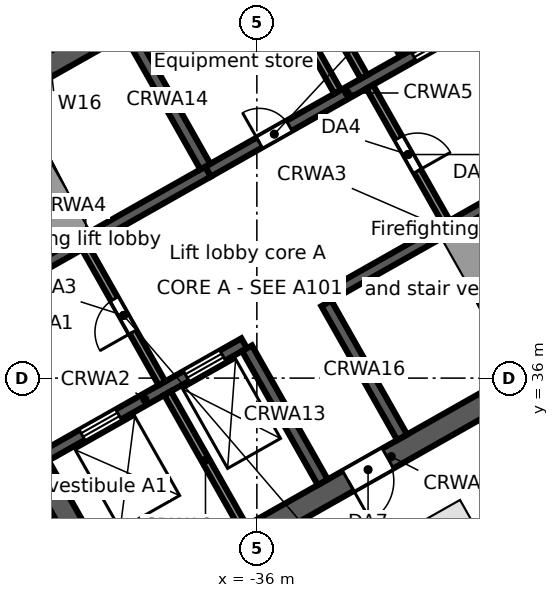
"""IFC4 building model, lengths in metres.
Left out: names, types, materials, properties, quantities, classifications, styles, units other than length and angle.
Written with IfcOpenShell. Run it as: python <this file> out.ifc"""

import sys

from ifc_helpers import new_model, si_unit, direction, frame, frame_2d, origin, origin_2d, place, context, subcontext, project, spatial, rectangle, extrude, element, fill, save


model = new_model("IFC4")
c1 = context("Model", 3, precision=1e-05, world=origin(), true_north=direction((0.0, 1.0)))
c2 = subcontext(c1, "Body", "Model", "MODEL_VIEW")
j1 = project(units=[si_unit("LENGTHUNIT", "METRE"), si_unit("PLANEANGLEUNIT", "RADIAN")], contexts=[c1])
p1 = place(None, origin())
s1 = spatial("IfcSite", under=j1, at=p1, CompositionType="ELEMENT")
p2 = place(p1, origin())
s2 = spatial("IfcBuilding", under=s1, at=p2, CompositionType="ELEMENT")
p3 = place(p2, origin())
s3 = spatial("IfcBuildingStorey", under=s2, at=p3, CompositionType="ELEMENT", Elevation=0.0)
p4 = place(p3, frame((-30.976, 31.635, 0.0), z_axis=(0.0, 0.0, 1.0), x_axis=(0.87035569594, 0.492423560103, 0.0)))
e1 = element("IfcColumn", 1, at=p4, inside=s3, PredefinedType="COLUMN", context=c2, shape_type="SweptSolid", body=[
    extrude(rectangle(XDim=1.7, YDim=1.7, at=origin_2d()), origin(), (0.0, 0.0, 1.0), 6.5),
])
p5 = place(p3, frame((-63.707, 41.701, 0.0), z_axis=(0.0, 0.0, 1.0), x_axis=(0.870355510268, 0.492423888277, 0.0)))
e2 = element("IfcWall", 2, at=p5, inside=s3, PredefinedType="STANDARD", context=c2, shape_type="SweptSolid", body=[
    extrude(rectangle(XDim=67.903, YDim=0.3, at=frame_2d((33.952, 0.0))), origin(), (0.0, 0.0, 1.0), 6.15),
])
p6 = place(p5, frame((44.274, 0.0, 0.0)))
e3 = element("IfcOpeningElement", 3, at=p6, cuts=e2, PredefinedType="OPENING", context=c2, shape_type="SweptSolid", body=[
    extrude(rectangle(XDim=1.2, YDim=2.4, at=frame_2d((0.6, 1.2))), frame((0.0, 0.16, 0.0), z_axis=(0.0, -1.0, 0.0), x_axis=(1.0, 0.0, 0.0)), (0.0, 0.0, 1.0), 0.32),
])
p7 = place(p5, frame((15.222, 0.0, 0.0)))
e4 = element("IfcOpeningElement", 4, at=p7, cuts=e2, PredefinedType="OPENING", context=c2, shape_type="SweptSolid", body=[
    extrude(rectangle(XDim=1.2, YDim=2.4, at=frame_2d((0.6, 1.2))), frame((0.0, 0.16, 0.0), z_axis=(0.0, -1.0, 0.0), x_axis=(1.0, 0.0, 0.0)), (0.0, 0.0, 1.0), 0.32),
])
p8 = place(p3, frame((-39.862, 29.749, 0.0), z_axis=(0.0, 0.0, 1.0), x_axis=(0.870350116061, 0.492433422375, 0.0)))
e5 = element("IfcWall", 5, at=p8, inside=s3, PredefinedType="SOLIDWALL", context=c2, shape_type="SweptSolid", body=[
    extrude(rectangle(XDim=17.0, YDim=0.6, at=frame_2d((8.5, 0.0))), origin(), (0.0, 0.0, 1.0), 6.15),
])
p9 = place(p8, frame((7.2, 0.0, 0.0)))
e6 = element("IfcOpeningElement", 6, at=p9, cuts=e5, PredefinedType="OPENING", context=c2, shape_type="SweptSolid", body=[
    extrude(rectangle(XDim=1.2, YDim=2.1, at=frame_2d((0.6, 1.05))), frame((0.0, 0.31, 0.0), z_axis=(0.0, -1.0, 0.0), x_axis=(1.0, 0.0, 0.0)), (0.0, 0.0, 1.0), 0.62),
])
p10 = place(p3, frame((-41.556, 33.961, 0.0), z_axis=(0.0, 0.0, 1.0), x_axis=(0.870343731308, 0.492444706919, 0.0)))
e7 = element("IfcWall", 7, at=p10, inside=s3, PredefinedType="SOLIDWALL", context=c2, shape_type="SweptSolid", body=[
    extrude(rectangle(XDim=6.0, YDim=0.3, at=frame_2d((3.0, 0.0))), origin(), (0.0, 0.0, 1.0), 6.15),
])
p11 = place(p10, frame((1.1, 0.0, 0.0)))
e8 = element("IfcOpeningElement", 8, at=p11, cuts=e7, PredefinedType="OPENING", context=c2, shape_type="SweptSolid", body=[
    extrude(rectangle(XDim=1.1, YDim=2.1, at=frame_2d((0.55, 1.05))), frame((0.0, 0.16, 0.0), z_axis=(0.0, -1.0, 0.0), x_axis=(1.0, 0.0, 0.0)), (0.0, 0.0, 1.0), 0.32),
])
p12 = place(p10, frame((4.25, 0.0, 0.0)))
e9 = element("IfcOpeningElement", 9, at=p12, cuts=e7, PredefinedType="OPENING", context=c2, shape_type="SweptSolid", body=[
    extrude(rectangle(XDim=1.1, YDim=2.1, at=frame_2d((0.55, 1.05))), frame((0.0, 0.16, 0.0), z_axis=(0.0, -1.0, 0.0), x_axis=(1.0, 0.0, 0.0)), (0.0, 0.0, 1.0), 0.32),
])
p13 = place(p3, frame((-34.245, 38.097, 0.0), z_axis=(0.0, 0.0, 1.0), x_axis=(0.870364910201, 0.492407273597, 0.0)))
e10 = element("IfcWall", 10, at=p13, inside=s3, PredefinedType="SOLIDWALL", context=c2, shape_type="SweptSolid", body=[
    extrude(rectangle(XDim=7.4, YDim=0.3, at=frame_2d((3.7, 0.0))), origin(), (0.0, 0.0, 1.0), 6.15),
])
p14 = place(p13, frame((6.2, 0.0, 0.0)))
e11 = element("IfcOpeningElement", 11, at=p14, cuts=e10, PredefinedType="OPENING", context=c2, shape_type="SweptSolid", body=[
    extrude(rectangle(XDim=1.0, YDim=2.1, at=frame_2d((0.5, 1.05))), frame((0.0, 0.16, 0.0), z_axis=(0.0, -1.0, 0.0), x_axis=(1.0, 0.0, 0.0)), (0.0, 0.0, 1.0), 0.32),
])
p15 = place(p3, frame((-43.723, 37.791, 0.0), z_axis=(0.0, 0.0, 1.0), x_axis=(0.87035077051, 0.49243226567, 0.0)))
e12 = element("IfcWall", 12, at=p15, inside=s3, PredefinedType="SOLIDWALL", context=c2, shape_type="SweptSolid", body=[
    extrude(rectangle(XDim=7.4, YDim=0.3, at=frame_2d((3.7, 0.0))), origin(), (0.0, 0.0, 1.0), 6.15),
])
p16 = place(p15, frame((0.2, 0.0, 0.0)))
e13 = element("IfcOpeningElement", 13, at=p16, cuts=e12, PredefinedType="OPENING", context=c2, shape_type="SweptSolid", body=[
    extrude(rectangle(XDim=1.0, YDim=2.1, at=frame_2d((0.5, 1.05))), frame((0.0, 0.16, 0.0), z_axis=(0.0, -1.0, 0.0), x_axis=(1.0, 0.0, 0.0)), (0.0, 0.0, 1.0), 0.32),
])
p17 = place(p3, frame((-37.282, 41.435, 0.0), z_axis=(0.0, 0.0, 1.0), x_axis=(0.870356516133, 0.492422110414, 0.0)))
e14 = element("IfcWall", 14, at=p17, inside=s3, PredefinedType="SOLIDWALL", context=c2, shape_type="SweptSolid", body=[
    extrude(rectangle(XDim=8.4, YDim=0.3, at=frame_2d((4.2, 0.0))), origin(), (0.0, 0.0, 1.0), 6.15),
])
p18 = place(p17, frame((6.2, 0.0, 0.0)))
e15 = element("IfcOpeningElement", 15, at=p18, cuts=e14, PredefinedType="OPENING", context=c2, shape_type="SweptSolid", body=[
    extrude(rectangle(XDim=1.1, YDim=2.1, at=frame_2d((0.55, 1.05))), frame((0.0, 0.16, 0.0), z_axis=(0.0, -1.0, 0.0), x_axis=(1.0, 0.0, 0.0)), (0.0, 0.0, 1.0), 0.32),
])
p19 = place(p17, frame((1.55, 0.0, 0.0)))
e16 = element("IfcOpeningElement", 16, at=p19, cuts=e14, PredefinedType="OPENING", context=c2, shape_type="SweptSolid", body=[
    extrude(rectangle(XDim=0.9, YDim=2.1, at=frame_2d((0.45, 1.05))), frame((0.0, 0.16, 0.0), z_axis=(0.0, -1.0, 0.0), x_axis=(1.0, 0.0, 0.0)), (0.0, 0.0, 1.0), 0.32),
])
p20 = place(p3, frame((-46.461, 41.412, 0.0), z_axis=(0.0, 0.0, 1.0), x_axis=(0.870350116061, 0.492433422375, 0.0)))
e17 = element("IfcWall", 17, at=p20, inside=s3, PredefinedType="SOLIDWALL", context=c2, shape_type="SweptSolid", body=[
    extrude(rectangle(XDim=17.0, YDim=0.6, at=frame_2d((8.5, 0.0))), origin(), (0.0, 0.0, 1.0), 6.15),
])
p21 = place(p3, frame((-46.052, 41.298, 0.0), z_axis=(0.0, 0.0, 1.0), x_axis=(0.492418598281, -0.870358503186, 0.0)))
e18 = element("IfcWall", 18, at=p21, inside=s3, PredefinedType="SOLIDWALL", context=c2, shape_type="SweptSolid", body=[
    extrude(rectangle(XDim=12.8, YDim=0.6, at=frame_2d((6.4, 0.0))), origin(), (0.0, 0.0, 1.0), 6.15),
])
p22 = place(p21, frame((5.8, 0.0, 0.0)))
e19 = element("IfcOpeningElement", 19, at=p22, cuts=e18, PredefinedType="OPENING", context=c2, shape_type="SweptSolid", body=[
    extrude(rectangle(XDim=1.2, YDim=2.1, at=frame_2d((0.6, 1.05))), frame((0.0, 0.31, 0.0), z_axis=(0.0, -1.0, 0.0), x_axis=(1.0, 0.0, 0.0)), (0.0, 0.0, 1.0), 0.62),
])
p23 = place(p3, frame((-38.349, 35.603, 0.0), z_axis=(0.0, 0.0, 1.0), x_axis=(0.49241474071, -0.870360685654, 0.0)))
e20 = element("IfcWall", 20, at=p23, inside=s3, PredefinedType="SOLIDWALL", context=c2, shape_type="SweptSolid", body=[
    extrude(rectangle(XDim=4.05, YDim=0.2, at=frame_2d((2.025, 0.0))), origin(), (0.0, 0.0, 1.0), 6.15),
])
p24 = place(p3, frame((-40.516, 39.433, 0.0), z_axis=(0.0, 0.0, 1.0), x_axis=(0.492453559952, -0.87033872216, 0.0)))
e21 = element("IfcWall", 21, at=p24, inside=s3, PredefinedType="PARTITIONING", context=c2, shape_type="SweptSolid", body=[
    extrude(rectangle(XDim=4.1, YDim=0.2, at=frame_2d((2.05, 0.0))), origin(), (0.0, 0.0, 1.0), 6.15),
])
p25 = place(p24, frame((1.55, 0.0, 0.0)))
e22 = element("IfcOpeningElement", 22, at=p25, cuts=e21, PredefinedType="OPENING", context=c2, shape_type="SweptSolid", body=[
    extrude(rectangle(XDim=1.0, YDim=2.1, at=frame_2d((0.5, 1.05))), frame((0.0, 0.11, 0.0), z_axis=(0.0, -1.0, 0.0), x_axis=(1.0, 0.0, 0.0)), (0.0, 0.0, 1.0), 0.22),
])
p26 = place(p3, frame((-36.26, 36.785, 0.0), z_axis=(0.0, 0.0, 1.0), x_axis=(0.492440575896, -0.870346068648, 0.0)))
e23 = element("IfcWall", 23, at=p26, inside=s3, PredefinedType="SOLIDWALL", context=c2, shape_type="SweptSolid", body=[
    extrude(rectangle(XDim=4.05, YDim=0.3, at=frame_2d((2.025, 0.0))), origin(), (0.0, 0.0, 1.0), 6.15),
])
p27 = place(p3, frame((-39.35, 45.09, 0.0), z_axis=(0.0, 0.0, 1.0), x_axis=(0.49241474071, -0.870360685654, 0.0)))
e24 = element("IfcWall", 24, at=p27, inside=s3, PredefinedType="SOLIDWALL", context=c2, shape_type="SweptSolid", body=[
    extrude(rectangle(XDim=4.05, YDim=0.3, at=frame_2d((2.025, 0.0))), origin(), (0.0, 0.0, 1.0), 6.15),
])
p28 = place(p3, frame((-34.171, 37.967, 0.0), z_axis=(0.0, 0.0, 1.0), x_axis=(0.492394910396, -0.870371904542, 0.0)))
e25 = element("IfcWall", 25, at=p28, inside=s3, PredefinedType="SOLIDWALL", context=c2, shape_type="SweptSolid", body=[
    extrude(rectangle(XDim=4.05, YDim=0.3, at=frame_2d((2.025, 0.0))), origin(), (0.0, 0.0, 1.0), 6.15),
])
p29 = place(p3, frame((-35.869, 47.06, 0.0), z_axis=(0.0, 0.0, 1.0), x_axis=(0.49241474071, -0.870360685654, 0.0)))
e26 = element("IfcWall", 26, at=p29, inside=s3, PredefinedType="SOLIDWALL", context=c2, shape_type="SweptSolid", body=[
    extrude(rectangle(XDim=4.05, YDim=0.2, at=frame_2d((2.025, 0.0))), origin(), (0.0, 0.0, 1.0), 6.15),
])
p30 = place(p3, frame((-33.031, 43.667, 0.0), z_axis=(0.0, 0.0, 1.0), x_axis=(0.492408451753, -0.87036424366, 0.0)))
e27 = element("IfcWall", 27, at=p30, inside=s3, PredefinedType="PARTITIONING", context=c2, shape_type="SweptSolid", body=[
    extrude(rectangle(XDim=4.1, YDim=0.2, at=frame_2d((2.05, 0.0))), origin(), (0.0, 0.0, 1.0), 6.15),
])
p31 = place(p30, frame((1.55, 0.0, 0.0)))
e28 = element("IfcOpeningElement", 28, at=p31, cuts=e27, PredefinedType="OPENING", context=c2, shape_type="SweptSolid", body=[
    extrude(rectangle(XDim=1.0, YDim=2.1, at=frame_2d((0.5, 1.05))), frame((0.0, 0.11, 0.0), z_axis=(0.0, -1.0, 0.0), x_axis=(1.0, 0.0, 0.0)), (0.0, 0.0, 1.0), 0.22),
])
p32 = place(p3, frame((-35.173, 47.454, 0.0), z_axis=(0.0, 0.0, 1.0), x_axis=(0.492440575896, -0.870346068648, 0.0)))
e29 = element("IfcWall", 29, at=p32, inside=s3, PredefinedType="SOLIDWALL", context=c2, shape_type="SweptSolid", body=[
    extrude(rectangle(XDim=4.05, YDim=0.2, at=frame_2d((2.025, 0.0))), origin(), (0.0, 0.0, 1.0), 6.15),
])
p33 = place(p3, frame((-31.778, 49.374, 0.0), z_axis=(0.0, 0.0, 1.0), x_axis=(0.492433046652, -0.870350328641, 0.0)))
e30 = element("IfcWall", 30, at=p33, inside=s3, PredefinedType="SOLIDWALL", context=c2, shape_type="SweptSolid", body=[
    extrude(rectangle(XDim=12.8, YDim=0.6, at=frame_2d((6.4, 0.0))), origin(), (0.0, 0.0, 1.0), 6.15),
])
p34 = place(p33, frame((5.8, 0.0, 0.0)))
e31 = element("IfcOpeningElement", 31, at=p34, cuts=e30, PredefinedType="OPENING", context=c2, shape_type="SweptSolid", body=[
    extrude(rectangle(XDim=1.2, YDim=2.1, at=frame_2d((0.6, 1.05))), frame((0.0, 0.31, 0.0), z_axis=(0.0, -1.0, 0.0), x_axis=(1.0, 0.0, 0.0)), (0.0, 0.0, 1.0), 0.62),
])
p35 = place(p3, frame((-61.823, 37.087, 0.0), z_axis=(0.0, 0.0, 1.0), x_axis=(0.854710834679, -0.519104410579, 0.0)))
e32 = element("IfcWall", 32, at=p35, inside=s3, PredefinedType="PARTITIONING", context=c2, shape_type="SweptSolid", body=[
    extrude(rectangle(XDim=24.064, YDim=0.125, at=frame_2d((12.032, 0.0))), origin(), (0.0, 0.0, 1.0), 5.212),
])
p36 = place(p18, origin())
e33 = element("IfcDoor", 33, at=p36, inside=s3, OperationType="DOUBLE_DOOR_SLIDING", PredefinedType="DOOR", context=c2, shape_type="SweptSolid", body=[
    extrude(rectangle(XDim=1.1, YDim=2.1, at=frame_2d((0.55, 1.05))), frame((0.0, 0.025, 0.0), z_axis=(0.0, -1.0, 0.0), x_axis=(1.0, 0.0, 0.0)), (0.0, 0.0, 1.0), 0.05),
])
fill(e15, e33)
p37 = place(p11, origin())
e34 = element("IfcDoor", 34, at=p37, inside=s3, OperationType="DOUBLE_DOOR_SLIDING", PredefinedType="DOOR", context=c2, shape_type="SweptSolid", body=[
    extrude(rectangle(XDim=1.1, YDim=2.1, at=frame_2d((0.55, 1.05))), frame((0.0, 0.025, 0.0), z_axis=(0.0, -1.0, 0.0), x_axis=(1.0, 0.0, 0.0)), (0.0, 0.0, 1.0), 0.05),
])
fill(e8, e34)
p38 = place(p12, origin())
e35 = element("IfcDoor", 35, at=p38, inside=s3, OperationType="DOUBLE_DOOR_SLIDING", PredefinedType="DOOR", context=c2, shape_type="SweptSolid", body=[
    extrude(rectangle(XDim=1.1, YDim=2.1, at=frame_2d((0.55, 1.05))), frame((0.0, 0.025, 0.0), z_axis=(0.0, -1.0, 0.0), x_axis=(1.0, 0.0, 0.0)), (0.0, 0.0, 1.0), 0.05),
])
fill(e9, e35)
p39 = place(p25, frame((1.0, 0.0, 0.0), z_axis=(0.0, 0.0, 1.0), x_axis=(-1.0, 0.0, 0.0)))
e36 = element("IfcDoor", 36, at=p39, inside=s3, OperationType="SINGLE_SWING_LEFT", PredefinedType="DOOR", context=c2, shape_type="SweptSolid", body=[
    extrude(rectangle(XDim=1.0, YDim=2.1, at=frame_2d((0.5, 1.05))), frame((0.0, 0.025, 0.0), z_axis=(0.0, -1.0, 0.0), x_axis=(1.0, 0.0, 0.0)), (0.0, 0.0, 1.0), 0.05),
])
fill(e22, e36)
p40 = place(p31, origin())
e37 = element("IfcDoor", 37, at=p40, inside=s3, OperationType="SINGLE_SWING_RIGHT", PredefinedType="DOOR", context=c2, shape_type="SweptSolid", body=[
    extrude(rectangle(XDim=1.0, YDim=2.1, at=frame_2d((0.5, 1.05))), frame((0.0, 0.025, 0.0), z_axis=(0.0, -1.0, 0.0), x_axis=(1.0, 0.0, 0.0)), (0.0, 0.0, 1.0), 0.05),
])
fill(e28, e37)
p41 = place(p9, frame((1.2, 0.0, 0.0), z_axis=(0.0, 0.0, 1.0), x_axis=(-1.0, 0.0, 0.0)))
e38 = element("IfcDoor", 38, at=p41, inside=s3, OperationType="SINGLE_SWING_RIGHT", PredefinedType="DOOR", context=c2, shape_type="SweptSolid", body=[
    extrude(rectangle(XDim=1.2, YDim=2.1, at=frame_2d((0.6, 1.05))), frame((0.0, 0.025, 0.0), z_axis=(0.0, -1.0, 0.0), x_axis=(1.0, 0.0, 0.0)), (0.0, 0.0, 1.0), 0.05),
])
fill(e6, e38)
p42 = place(p19, origin())
e39 = element("IfcDoor", 39, at=p42, inside=s3, OperationType="SINGLE_SWING_LEFT", PredefinedType="DOOR", context=c2, shape_type="SweptSolid", body=[
    extrude(rectangle(XDim=0.9, YDim=2.1, at=frame_2d((0.45, 1.05))), frame((0.0, 0.025, 0.0), z_axis=(0.0, -1.0, 0.0), x_axis=(1.0, 0.0, 0.0)), (0.0, 0.0, 1.0), 0.05),
])
fill(e16, e39)
save(model, sys.argv[1])
